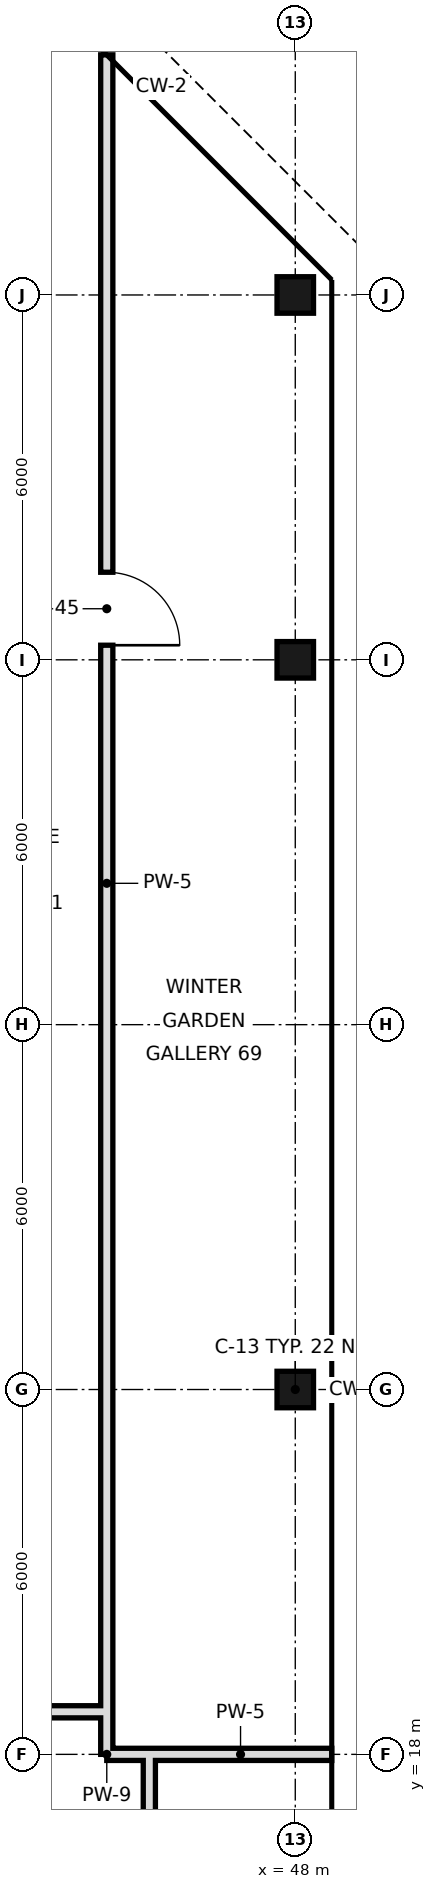
"""IFC4 building model, lengths in metres.
Left out: names, types, materials, properties, quantities, classifications, styles, units other than length and angle.
Written with IfcOpenShell. Run it as: python <this file> out.ifc"""

import sys

from ifc_helpers import new_model, si_unit, direction, frame, frame_2d, origin, origin_2d, place, context, subcontext, project, spatial, rectangle, hollow_rectangle, extrude, element, fill, save


model = new_model("IFC4")
c1 = context("Model", 3, precision=1e-05, world=origin(), true_north=direction((0.0, 1.0)))
c2 = subcontext(c1, "Body", "Model", "MODEL_VIEW")
j1 = project(units=[si_unit("LENGTHUNIT", "METRE"), si_unit("PLANEANGLEUNIT", "RADIAN")], contexts=[c1])
p1 = place(None, origin())
s1 = spatial("IfcSite", under=j1, at=p1, CompositionType="ELEMENT")
p2 = place(p1, origin())
s2 = spatial("IfcBuilding", under=s1, at=p2, CompositionType="ELEMENT")
p3 = place(p2, frame((0.0, 0.0, 294.4)))
s3 = spatial("IfcBuildingStorey", under=s2, at=p3, CompositionType="ELEMENT", Elevation=294.4)
for number, where, z_axis, x_axis in (
    (1, (48.0, 24.0, 0.0), (0.0, 0.0, 1.0), (1.0, 0.0, 0.0)),
    (2, (48.0, 36.0, 0.0), (0.0, 0.0, 1.0), (1.0, 0.0, 0.0)),
    (3, (48.0, 42.0, 0.0), (0.0, 0.0, 1.0), (1.0, 0.0, 0.0)),
):
    element("IfcColumn", number, at=place(p3, frame(where, z_axis=z_axis, x_axis=x_axis)), inside=s3, PredefinedType="COLUMN", context=c2, shape_type="SweptSolid", body=[
        extrude(hollow_rectangle(XDim=0.6, YDim=0.6, WallThickness=0.028, at=origin_2d()), origin(), (0.0, 0.0, 1.0), 3.6),
    ])
p4 = place(p3, frame((44.9, 18.7, 0.0), z_axis=(0.0, 0.0, 1.0), x_axis=(0.0, 1.0, 0.0)))
e4 = element("IfcWall", 4, at=p4, inside=s3, PredefinedType="SOLIDWALL", context=c2, shape_type="SweptSolid", body=[
    extrude(rectangle(XDim=27.249, YDim=0.2, at=frame_2d((13.625, 0.0))), origin(), (0.0, 0.0, 1.0), 2.97),
])
p5 = place(p4, frame((17.54, 0.0, 0.0)))
e5 = element("IfcOpeningElement", 5, at=p5, cuts=e4, PredefinedType="OPENING", context=c2, shape_type="SweptSolid", body=[
    extrude(rectangle(XDim=1.2, YDim=2.4, at=frame_2d((0.6, 1.2))), frame((0.0, 0.11, 0.0), z_axis=(0.0, -1.0, 0.0), x_axis=(1.0, 0.0, 0.0)), (0.0, 0.0, 1.0), 0.22),
])
p6 = place(p3, frame((44.9, 18.0, 0.0), z_axis=(0.0, 0.0, 1.0), x_axis=(0.0, 1.0, 0.0)))
e6 = element("IfcWall", 6, at=p6, inside=s3, PredefinedType="SOLIDWALL", context=c2, shape_type="SweptSolid", body=[
    extrude(rectangle(XDim=0.7, YDim=0.2, at=frame_2d((0.35, 0.0))), origin(), (0.0, 0.0, 1.0), 2.97),
])
p7 = place(p3, frame((45.6, 10.8, 0.0), z_axis=(0.0, 0.0, 1.0), x_axis=(0.0, 1.0, 0.0)))
e7 = element("IfcWall", 7, at=p7, inside=s3, PredefinedType="SOLIDWALL", context=c2, shape_type="SweptSolid", body=[
    extrude(rectangle(XDim=7.2, YDim=0.2, at=frame_2d((3.6, 0.0))), origin(), (0.0, 0.0, 1.0), 2.72),
])
p8 = place(p3, frame((45.6, 18.0, 0.0), z_axis=(0.0, 0.0, 1.0), x_axis=(1.0, 0.0, 0.0)))
e8 = element("IfcWall", 8, at=p8, inside=s3, PredefinedType="SOLIDWALL", context=c2, shape_type="SweptSolid", body=[
    extrude(rectangle(XDim=3.0, YDim=0.2, at=frame_2d((1.5, 0.0))), origin(), (0.0, 0.0, 1.0), 2.72),
])
p9 = place(p3, frame((44.9, 18.0, 0.0), z_axis=(0.0, 0.0, 1.0), x_axis=(1.0, 0.0, 0.0)))
e9 = element("IfcWall", 9, at=p9, inside=s3, PredefinedType="SOLIDWALL", context=c2, shape_type="SweptSolid", body=[
    extrude(rectangle(XDim=0.7, YDim=0.2, at=frame_2d((0.35, 0.0))), origin(), (0.0, 0.0, 1.0), 2.97),
])
p10 = place(p3, frame((40.8, 18.7, 0.0), z_axis=(0.0, 0.0, 1.0), x_axis=(1.0, 0.0, 0.0)))
e10 = element("IfcWall", 10, at=p10, inside=s3, PredefinedType="SOLIDWALL", context=c2, shape_type="SweptSolid", body=[
    extrude(rectangle(XDim=4.1, YDim=0.2, at=frame_2d((2.05, 0.0))), origin(), (0.0, 0.0, 1.0), 2.72),
])
p11 = place(p5, frame((1.2, 0.0, 0.0), z_axis=(0.0, 0.0, 1.0), x_axis=(-1.0, 0.0, 0.0)))
e11 = element("IfcDoor", 11, at=p11, inside=s3, OperationType="SINGLE_SWING_RIGHT", PredefinedType="DOOR", context=c2, shape_type="SweptSolid", body=[
    extrude(rectangle(XDim=1.2, YDim=2.4, at=frame_2d((0.6, 1.2))), frame((0.0, 0.025, 0.0), z_axis=(0.0, -1.0, 0.0), x_axis=(1.0, 0.0, 0.0)), (0.0, 0.0, 1.0), 0.05),
])
fill(e5, e11)
save(model, sys.argv[1])
